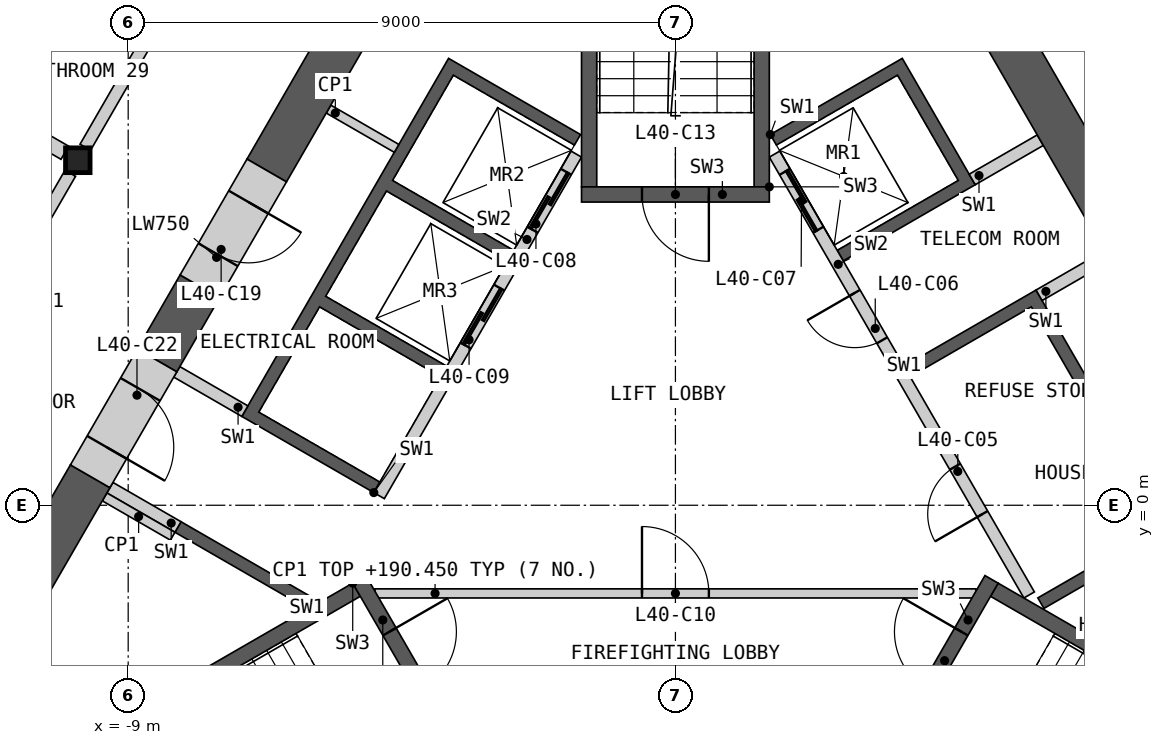
"""IFC4 building model, lengths in metres.
Left out: names, types, materials, properties, quantities, classifications, styles, units other than length and angle.
Written with IfcOpenShell. Run it as: python <this file> out.ifc"""

import sys

from ifc_helpers import new_model, si_unit, direction, frame, frame_2d, origin, origin_2d, place, context, subcontext, project, spatial, polyline, rectangle, i_section, outline, extrude, element, fill, save


model = new_model("IFC4")
c1 = context("Model", 3, precision=1e-05, world=origin(), true_north=direction((0.0, 1.0)))
c2 = subcontext(c1, "Body", "Model", "MODEL_VIEW")
j1 = project(units=[si_unit("LENGTHUNIT", "METRE"), si_unit("PLANEANGLEUNIT", "RADIAN")], contexts=[c1])
p1 = place(None, origin())
s1 = spatial("IfcSite", under=j1, at=p1, CompositionType="ELEMENT")
p2 = place(p1, origin())
s2 = spatial("IfcBuilding", under=s1, at=p2, CompositionType="ELEMENT")
p3 = place(p2, frame((0.0, 0.0, 187.2)))
s3 = spatial("IfcBuildingStorey", under=s2, at=p3, CompositionType="ELEMENT", Elevation=187.2)
p4 = place(p3, frame((-9.828, 5.675, 0.0), z_axis=(0.0, 0.0, 1.0), x_axis=(1.0, 0.0, 0.0)))
e1 = element("IfcColumn", 1, at=p4, inside=s3, PredefinedType="COLUMN", context=c2, shape_type="SweptSolid", body=[
    extrude(i_section(OverallWidth=0.404, OverallDepth=0.407, WebThickness=0.027, FlangeThickness=0.044, at=origin_2d()), origin(), (0.0, 0.0, 1.0), 3.6),
])
p5 = place(p3, origin())
e2 = element("IfcWall", 2, at=p5, inside=s3, PredefinedType="SHEAR", context=c2, shape_type="SweptSolid", body=[
    extrude(outline(polyline([(1.561, 6.097), (3.731, 7.35), (4.931, 5.272), (2.76, 4.019), (2.66, 4.192), (4.652, 5.342), (3.652, 7.074), (1.66, 5.924), (1.561, 6.097)])), origin(), (0.0, 0.0, 1.0), 3.25),
])
p6 = place(p3, origin())
e3 = element("IfcWall", 3, at=p6, inside=s3, PredefinedType="SHEAR", context=c2, shape_type="SweptSolid", body=[
    extrude(outline(polyline([(3.76, 2.287), (5.931, 3.54), (8.231, -0.444), (6.061, -1.697), (5.96, -1.524), (7.952, -0.374), (5.852, 3.263), (3.861, 2.113), (3.76, 2.287)])), origin(), (0.0, 0.0, 1.0), 3.25),
])
p7 = place(p3, frame((5.817, -1.476, 0.0), z_axis=(0.0, 0.0, 1.0), x_axis=(-0.500002616675, 0.866023893041, 0.0)))
e4 = element("IfcWall", 4, at=p7, inside=s3, PredefinedType="SOLIDWALL", context=c2, shape_type="SweptSolid", body=[
    extrude(rectangle(XDim=8.373, YDim=0.2, at=frame_2d((4.187, 0.0))), origin(), (0.0, 0.0, 1.0), 3.25),
])
p8 = place(p7, frame((1.537, 0.0, 0.0)))
e5 = element("IfcOpeningElement", 5, at=p8, cuts=e4, PredefinedType="OPENING", context=c2, shape_type="SweptSolid", body=[
    extrude(rectangle(XDim=0.9, YDim=2.1, at=frame_2d((0.45, 1.05))), frame((0.0, 0.11, 0.0), z_axis=(0.0, -1.0, 0.0), x_axis=(1.0, 0.0, 0.0)), (0.0, 0.0, 1.0), 0.22),
])
p9 = place(p7, frame((4.837, 0.0, 0.0)))
e6 = element("IfcOpeningElement", 6, at=p9, cuts=e4, PredefinedType="OPENING", context=c2, shape_type="SweptSolid", body=[
    extrude(rectangle(XDim=0.9, YDim=2.1, at=frame_2d((0.45, 1.05))), frame((0.0, 0.11, 0.0), z_axis=(0.0, -1.0, 0.0), x_axis=(1.0, 0.0, 0.0)), (0.0, 0.0, 1.0), 0.22),
])
p10 = place(p7, frame((6.937, 0.0, 0.0)))
e7 = element("IfcOpeningElement", 7, at=p10, cuts=e4, PredefinedType="OPENING", context=c2, shape_type="SweptSolid", body=[
    extrude(rectangle(XDim=1.1, YDim=2.1, at=frame_2d((0.55, 1.05))), frame((0.0, 0.11, 0.0), z_axis=(0.0, -1.0, 0.0), x_axis=(1.0, 0.0, 0.0)), (0.0, 0.0, 1.0), 0.22),
])
p11 = place(p3, frame((5.981, 3.453, 0.0), z_axis=(0.0, 0.0, 1.0), x_axis=(0.865968639725, 0.500098305348, 0.0)))
e8 = element("IfcWall", 8, at=p11, inside=s3, PredefinedType="SHEAR", context=c2, shape_type="SweptSolid", body=[
    extrude(rectangle(XDim=1.293, YDim=0.2, at=frame_2d((0.646, 0.0))), origin(), (0.0, 0.0, 1.0), 3.25),
])
p12 = place(p3, frame((4.881, 5.358, 0.0), z_axis=(0.0, 0.0, 1.0), x_axis=(0.866084958089, 0.499896834728, 0.0)))
e9 = element("IfcWall", 9, at=p12, inside=s3, PredefinedType="SHEAR", context=c2, shape_type="SweptSolid", body=[
    extrude(rectangle(XDim=1.293, YDim=0.2, at=frame_2d((0.646, 0.0))), origin(), (0.0, 0.0, 1.0), 3.25),
])
p13 = place(p3, origin())
e10 = element("IfcWall", 10, at=p13, inside=s3, PredefinedType="SHEAR", context=c2, shape_type="SweptSolid", body=[
    extrude(outline(polyline([(-6.061, -1.697), (-8.231, -0.444), (-8.131, -0.271), (-5.96, -1.524), (-6.061, -1.697)])), origin(), (0.0, 0.0, 1.0), 3.25),
])
p14 = place(p3, origin())
e11 = element("IfcWall", 11, at=p14, inside=s3, PredefinedType="SHEAR", context=c2, shape_type="SweptSolid", body=[
    extrude(outline(polyline([(-4.96, 0.208), (-7.131, 1.461), (-3.731, 7.35), (-1.561, 6.097), (-1.66, 5.924), (-3.652, 7.074), (-4.652, 5.342), (-2.66, 4.192), (-2.76, 4.019), (-4.752, 5.169), (-5.752, 3.437), (-3.76, 2.287), (-3.861, 2.113), (-5.852, 3.263), (-6.852, 1.531), (-4.861, 0.381), (-4.96, 0.208)])), origin(), (0.0, 0.0, 1.0), 3.25),
])
p15 = place(p3, frame((-1.631, 5.776, 0.0), z_axis=(0.0, 0.0, 1.0), x_axis=(-0.499992876559, -0.866029516466, 0.0)))
e12 = element("IfcWall", 12, at=p15, inside=s3, PredefinedType="SOLIDWALL", context=c2, shape_type="SweptSolid", body=[
    extrude(rectangle(XDim=6.486, YDim=0.2, at=frame_2d((3.243, 0.0))), origin(), (0.0, 0.0, 1.0), 3.25),
])
p16 = place(p15, frame((0.337, 0.0, 0.0)))
e13 = element("IfcOpeningElement", 13, at=p16, cuts=e12, PredefinedType="OPENING", context=c2, shape_type="SweptSolid", body=[
    extrude(rectangle(XDim=1.1, YDim=2.1, at=frame_2d((0.55, 1.05))), frame((0.0, 0.11, 0.0), z_axis=(0.0, -1.0, 0.0), x_axis=(1.0, 0.0, 0.0)), (0.0, 0.0, 1.0), 0.22),
])
p17 = place(p15, frame((2.537, 0.0, 0.0)))
e14 = element("IfcOpeningElement", 14, at=p17, cuts=e12, PredefinedType="OPENING", context=c2, shape_type="SweptSolid", body=[
    extrude(rectangle(XDim=1.1, YDim=2.1, at=frame_2d((0.55, 1.05))), frame((0.0, 0.11, 0.0), z_axis=(0.0, -1.0, 0.0), x_axis=(1.0, 0.0, 0.0)), (0.0, 0.0, 1.0), 0.22),
])
for number, where, z_axis, x_axis in (
    (15, (-7.081, 1.548, 0.0), (0.0, 0.0, 1.0), (-0.866, 0.5, 0.0)),
    (16, (-8.181, -0.357, 0.0), (0.0, 0.0, 1.0), (-0.866, 0.5, 0.0)),
):
    element("IfcWall", number, at=place(p3, frame(where, z_axis=z_axis, x_axis=x_axis)), inside=s3, PredefinedType="SHEAR", context=c2, shape_type="SweptSolid", body=[
        extrude(rectangle(XDim=1.293, YDim=0.2, at=frame_2d((0.646, 0.0))), origin(), (0.0, 0.0, 1.0), 3.25),
    ])
p18 = place(p3, frame((-4.941, -1.45, 0.0), z_axis=(0.0, 0.0, 1.0), x_axis=(1.0, 0.0, 0.0)))
e17 = element("IfcWall", 17, at=p18, inside=s3, PredefinedType="PARTITIONING", context=c2, shape_type="SweptSolid", body=[
    extrude(rectangle(XDim=9.882, YDim=0.15, at=frame_2d((4.941, 0.0))), origin(), (0.0, 0.0, 1.0), 3.25),
])
p19 = place(p18, frame((4.391, 0.0, 0.0)))
e18 = element("IfcOpeningElement", 18, at=p19, cuts=e17, PredefinedType="OPENING", context=c2, shape_type="SweptSolid", body=[
    extrude(rectangle(XDim=1.1, YDim=2.1, at=frame_2d((0.55, 1.05))), frame((0.0, 0.085, 0.0), z_axis=(0.0, -1.0, 0.0), x_axis=(1.0, 0.0, 0.0)), (0.0, 0.0, 1.0), 0.17),
])
p20 = place(p3, origin())
e19 = element("IfcWall", 19, at=p20, inside=s3, PredefinedType="SHEAR", context=c2, shape_type="SweptSolid", body=[
    extrude(outline(polyline([(-5.307, -1.281), (-10.374, -4.206), (-10.032, -4.298), (-5.182, -1.498), (-5.307, -1.281)])), origin(), (0.0, 0.0, 1.0), 3.25),
])
p21 = place(p3, frame((-5.199, -1.219, 0.0), z_axis=(0.0, 0.0, 1.0), x_axis=(0.499982516597, -0.866035497597, 0.0)))
e20 = element("IfcWall", 20, at=p21, inside=s3, PredefinedType="SHEAR", context=c2, shape_type="SweptSolid", body=[
    extrude(rectangle(XDim=3.088, YDim=0.25, at=frame_2d((1.544, 0.0))), origin(), (0.0, 0.0, 1.0), 3.25),
])
p22 = place(p21, frame((0.994, 0.0, 0.0)))
e21 = element("IfcOpeningElement", 21, at=p22, cuts=e20, PredefinedType="OPENING", context=c2, shape_type="SweptSolid", body=[
    extrude(rectangle(XDim=1.1, YDim=2.1, at=frame_2d((0.55, 1.05))), frame((0.0, 0.135, 0.0), z_axis=(0.0, -1.0, 0.0), x_axis=(1.0, 0.0, 0.0)), (0.0, 0.0, 1.0), 0.27),
])
p23 = place(p3, origin())
e22 = element("IfcWall", 22, at=p23, inside=s3, PredefinedType="SHEAR", context=c2, shape_type="SweptSolid", body=[
    extrude(outline(polyline([(10.032, -4.298), (10.374, -4.206), (5.307, -1.281), (5.182, -1.498), (10.032, -4.298)])), origin(), (0.0, 0.0, 1.0), 3.25),
])
p24 = place(p3, frame((3.655, -3.893, 0.0), z_axis=(0.0, 0.0, 1.0), x_axis=(0.499982516597, 0.866035497597, 0.0)))
e23 = element("IfcWall", 23, at=p24, inside=s3, PredefinedType="SHEAR", context=c2, shape_type="SweptSolid", body=[
    extrude(rectangle(XDim=3.088, YDim=0.25, at=frame_2d((1.544, 0.0))), origin(), (0.0, 0.0, 1.0), 3.25),
])
p25 = place(p24, frame((0.994, 0.0, 0.0)))
e24 = element("IfcOpeningElement", 24, at=p25, cuts=e23, PredefinedType="OPENING", context=c2, shape_type="SweptSolid", body=[
    extrude(rectangle(XDim=1.1, YDim=2.1, at=frame_2d((0.55, 1.05))), frame((0.0, 0.135, 0.0), z_axis=(0.0, -1.0, 0.0), x_axis=(1.0, 0.0, 0.0)), (0.0, 0.0, 1.0), 0.27),
])
p26 = place(p3, origin())
e25 = element("IfcWall", 25, at=p26, inside=s3, PredefinedType="SHEAR", context=c2, shape_type="SweptSolid", body=[
    extrude(outline(polyline([(1.544, 5.237), (1.544, 11.087), (1.294, 10.837), (1.294, 5.237), (1.544, 5.237)])), origin(), (0.0, 0.0, 1.0), 3.25),
])
p27 = place(p3, origin())
e26 = element("IfcWall", 26, at=p27, inside=s3, PredefinedType="SHEAR", context=c2, shape_type="SweptSolid", body=[
    extrude(outline(polyline([(-1.294, 10.837), (-1.544, 11.087), (-1.544, 5.237), (-1.294, 5.237), (-1.294, 10.837)])), origin(), (0.0, 0.0, 1.0), 3.25),
])
p28 = place(p3, frame((1.544, 5.112, 0.0), z_axis=(0.0, 0.0, 1.0), x_axis=(-1.0, 0.0, 0.0)))
e27 = element("IfcWall", 27, at=p28, inside=s3, PredefinedType="SHEAR", context=c2, shape_type="SweptSolid", body=[
    extrude(rectangle(XDim=3.088, YDim=0.25, at=frame_2d((1.544, 0.0))), origin(), (0.0, 0.0, 1.0), 3.25),
])
p29 = place(p28, frame((0.994, 0.0, 0.0)))
e28 = element("IfcOpeningElement", 28, at=p29, cuts=e27, PredefinedType="OPENING", context=c2, shape_type="SweptSolid", body=[
    extrude(rectangle(XDim=1.1, YDim=2.1, at=frame_2d((0.55, 1.05))), frame((0.0, 0.135, 0.0), z_axis=(0.0, -1.0, 0.0), x_axis=(1.0, 0.0, 0.0)), (0.0, 0.0, 1.0), 0.27),
])
for number, where, z_axis, x_axis in (
    (29, (-8.268, -0.509, 0.0), (0.0, 0.0, 1.0), (-0.866, 0.5, 0.0)),
    (30, (-5.705, 6.516, 0.0), (0.0, 0.0, 1.0), (0.866, -0.5, 0.0)),
):
    element("IfcWall", number, at=place(p3, frame(where, z_axis=z_axis, x_axis=x_axis)), inside=s3, PredefinedType="PARTITIONING", context=c2, shape_type="SweptSolid", body=[
        extrude(rectangle(XDim=1.293, YDim=0.15, at=frame_2d((0.646, 0.0))), origin(), (0.0, 0.0, 1.0), 3.25),
    ])
p30 = place(p3, frame((7.964, 3.354, 0.0), z_axis=(0.0, 0.0, 1.0), x_axis=(-0.50002928721, 0.866008494146, 0.0)))
e31 = element("IfcWall", 31, at=p30, inside=s3, PredefinedType="SHEAR", context=c2, shape_type="SweptSolid", body=[
    extrude(rectangle(XDim=6.405, YDim=0.75, at=frame_2d((3.203, 0.0))), origin(), (0.0, 0.0, 1.0), 3.25),
])
p31 = place(p3, frame((-9.625, 0.477, 0.0), z_axis=(0.0, 0.0, 1.0), x_axis=(-0.499986234705, -0.866033351035, 0.0)))
e32 = element("IfcWall", 32, at=p31, inside=s3, PredefinedType="SHEAR", context=c2, shape_type="SweptSolid", body=[
    extrude(rectangle(XDim=9.801, YDim=0.75, at=frame_2d((4.9, 0.0))), origin(), (0.0, 0.0, 1.0), 3.25),
])
p32 = place(p3, frame((-2.622, 12.606, 0.0), z_axis=(0.0, 0.0, 1.0), x_axis=(-0.500014611105, -0.866016967894, 0.0)))
e33 = element("IfcWall", 33, at=p32, inside=s3, PredefinedType="SHEAR", context=c2, shape_type="SweptSolid", body=[
    extrude(rectangle(XDim=8.198, YDim=0.75, at=frame_2d((4.099, 0.0))), origin(), (0.0, 0.0, 1.0), 3.25),
])
p33 = place(p3, frame((-7.821, 3.601, 0.0), z_axis=(0.0, 0.0, 1.0), x_axis=(-0.49996263964, -0.866046972724, 0.0)))
e34 = element("IfcWall", 34, at=p33, inside=s3, PredefinedType="SHEAR", context=c2, shape_type="SweptSolid", body=[
    extrude(rectangle(XDim=1.408, YDim=0.75, at=frame_2d((0.704, 0.0))), origin(), (0.0, 0.0, 1.0), 3.25),
])
p34 = place(p3, frame((-6.721, 5.506, 0.0), z_axis=(0.0, 0.0, 1.0), x_axis=(-0.499946605688, -0.86605622881, 0.0)))
e35 = element("IfcWall", 35, at=p34, inside=s3, PredefinedType="SHEAR", context=c2, shape_type="SweptSolid", body=[
    extrude(rectangle(XDim=2.2, YDim=0.75, at=frame_2d((1.1, 0.0))), origin(), (0.0, 0.0, 1.0), 3.25),
])
p35 = place(p34, frame((0.6, 0.0, 0.0)))
e36 = element("IfcOpeningElement", 36, at=p35, cuts=e35, PredefinedType="OPENING", context=c2, shape_type="SweptSolid", body=[
    extrude(rectangle(XDim=1.0, YDim=2.1, at=frame_2d((0.5, 1.05))), frame((0.0, 0.385, 0.0), z_axis=(0.0, -1.0, 0.0), x_axis=(1.0, 0.0, 0.0)), (0.0, 0.0, 1.0), 0.77),
])
p36 = place(p3, frame((-8.525, 2.382, 0.0), z_axis=(0.0, 0.0, 1.0), x_axis=(-0.500077893725, -0.86598042715, 0.0)))
e37 = element("IfcWall", 37, at=p36, inside=s3, PredefinedType="SHEAR", context=c2, shape_type="SweptSolid", body=[
    extrude(rectangle(XDim=2.2, YDim=0.75, at=frame_2d((1.1, 0.0))), origin(), (0.0, 0.0, 1.0), 3.25),
])
p37 = place(p36, frame((0.55, 0.0, 0.0)))
e38 = element("IfcOpeningElement", 38, at=p37, cuts=e37, PredefinedType="OPENING", context=c2, shape_type="SweptSolid", body=[
    extrude(rectangle(XDim=1.1, YDim=2.1, at=frame_2d((0.55, 1.05))), frame((0.0, 0.385, 0.0), z_axis=(0.0, -1.0, 0.0), x_axis=(1.0, 0.0, 0.0)), (0.0, 0.0, 1.0), 0.77),
])
p38 = place(p3, frame((5.377, 19.385, 0.0), z_axis=(0.0, 0.0, 1.0), x_axis=(0.500000757641, -0.86602496636, 0.0)))
e39 = element("IfcWall", 39, at=p38, inside=s3, PredefinedType="PARTITIONING", context=c2, shape_type="SweptSolid", body=[
    extrude(rectangle(XDim=28.198, YDim=0.2, at=frame_2d((14.099, 0.0))), origin(), (0.0, 0.0, 1.0), 3.25),
])
p39 = place(p38, frame((22.735, 0.0, 0.0)))
e40 = element("IfcOpeningElement", 40, at=p39, cuts=e39, PredefinedType="OPENING", context=c2, shape_type="SweptSolid", body=[
    extrude(rectangle(XDim=1.8, YDim=2.1, at=frame_2d((0.9, 1.05))), frame((0.0, 0.11, 0.0), z_axis=(0.0, -1.0, 0.0), x_axis=(1.0, 0.0, 0.0)), (0.0, 0.0, 1.0), 0.22),
])
p40 = place(p38, frame((14.402, 0.0, 0.0)))
e41 = element("IfcOpeningElement", 41, at=p40, cuts=e39, PredefinedType="OPENING", context=c2, shape_type="SweptSolid", body=[
    extrude(rectangle(XDim=1.0, YDim=2.1, at=frame_2d((0.5, 1.05))), frame((0.0, 0.11, 0.0), z_axis=(0.0, -1.0, 0.0), x_axis=(1.0, 0.0, 0.0)), (0.0, 0.0, 1.0), 0.22),
])
p41 = place(p38, frame((12.796, 0.0, 0.0)))
e42 = element("IfcOpeningElement", 42, at=p41, cuts=e39, PredefinedType="OPENING", context=c2, shape_type="SweptSolid", body=[
    extrude(rectangle(XDim=1.0, YDim=2.1, at=frame_2d((0.5, 1.05))), frame((0.0, 0.11, 0.0), z_axis=(0.0, -1.0, 0.0), x_axis=(1.0, 0.0, 0.0)), (0.0, 0.0, 1.0), 0.22),
])
p42 = place(p38, frame((4.164, 0.0, 0.0)))
e43 = element("IfcOpeningElement", 43, at=p42, cuts=e39, PredefinedType="OPENING", context=c2, shape_type="SweptSolid", body=[
    extrude(rectangle(XDim=1.0, YDim=2.1, at=frame_2d((0.5, 1.05))), frame((0.0, 0.11, 0.0), z_axis=(0.0, -1.0, 0.0), x_axis=(1.0, 0.0, 0.0)), (0.0, 0.0, 1.0), 0.22),
])
p43 = place(p38, frame((1.452, 0.0, 0.0)))
e44 = element("IfcOpeningElement", 44, at=p43, cuts=e39, PredefinedType="OPENING", context=c2, shape_type="SweptSolid", body=[
    extrude(rectangle(XDim=0.95, YDim=2.1, at=frame_2d((0.475, 1.05))), frame((0.0, 0.11, 0.0), z_axis=(0.0, -1.0, 0.0), x_axis=(1.0, 0.0, 0.0)), (0.0, 0.0, 1.0), 0.22),
])
p44 = place(p3, frame((-21.0, 12.124, 0.0), z_axis=(0.0, 0.0, 1.0), x_axis=(0.866025883649, -0.499999168849, 0.0)))
e45 = element("IfcWall", 45, at=p44, inside=s3, PredefinedType="PARTITIONING", context=c2, shape_type="SweptSolid", body=[
    extrude(rectangle(XDim=12.652, YDim=0.25, at=frame_2d((6.326, 0.0))), origin(), (0.0, 0.0, 1.0), 2.404),
])
p45 = place(p3, frame((-9.705, 5.888, 0.0), z_axis=(0.0, 0.0, 1.0), x_axis=(0.50000393355, 0.866023132736, 0.0)))
e46 = element("IfcWall", 46, at=p45, inside=s3, PredefinedType="PARTITIONING", context=c2, shape_type="SweptSolid", body=[
    extrude(rectangle(XDim=9.335, YDim=0.2, at=frame_2d((4.667, 0.0))), origin(), (0.0, 0.0, 1.0), 3.25),
])
p46 = place(p45, frame((5.172, 0.0, 0.0)))
e47 = element("IfcOpeningElement", 47, at=p46, cuts=e46, PredefinedType="OPENING", context=c2, shape_type="SweptSolid", body=[
    extrude(rectangle(XDim=1.0, YDim=2.1, at=frame_2d((0.5, 1.05))), frame((0.0, 0.11, 0.0), z_axis=(0.0, -1.0, 0.0), x_axis=(1.0, 0.0, 0.0)), (0.0, 0.0, 1.0), 0.22),
])
p47 = place(p45, frame((3.565, 0.0, 0.0)))
e48 = element("IfcOpeningElement", 48, at=p47, cuts=e46, PredefinedType="OPENING", context=c2, shape_type="SweptSolid", body=[
    extrude(rectangle(XDim=1.0, YDim=2.1, at=frame_2d((0.5, 1.05))), frame((0.0, 0.11, 0.0), z_axis=(0.0, -1.0, 0.0), x_axis=(1.0, 0.0, 0.0)), (0.0, 0.0, 1.0), 0.22),
])
p48 = place(p3, frame((-14.619, -2.624, 0.0), z_axis=(0.0, 0.0, 1.0), x_axis=(0.50000393355, 0.866023132736, 0.0)))
e49 = element("IfcWall", 49, at=p48, inside=s3, PredefinedType="PARTITIONING", context=c2, shape_type="SweptSolid", body=[
    extrude(rectangle(XDim=9.335, YDim=0.2, at=frame_2d((4.667, 0.0))), origin(), (0.0, 0.0, 1.0), 3.25),
])
p49 = place(p48, frame((4.77, 0.0, 0.0)))
e50 = element("IfcOpeningElement", 50, at=p49, cuts=e49, PredefinedType="OPENING", context=c2, shape_type="SweptSolid", body=[
    extrude(rectangle(XDim=1.0, YDim=2.1, at=frame_2d((0.5, 1.05))), frame((0.0, 0.11, 0.0), z_axis=(0.0, -1.0, 0.0), x_axis=(1.0, 0.0, 0.0)), (0.0, 0.0, 1.0), 0.22),
])
p50 = place(p48, frame((3.163, 0.0, 0.0)))
e51 = element("IfcOpeningElement", 51, at=p50, cuts=e49, PredefinedType="OPENING", context=c2, shape_type="SweptSolid", body=[
    extrude(rectangle(XDim=1.0, YDim=2.1, at=frame_2d((0.5, 1.05))), frame((0.0, 0.11, 0.0), z_axis=(0.0, -1.0, 0.0), x_axis=(1.0, 0.0, 0.0)), (0.0, 0.0, 1.0), 0.22),
])
p51 = place(p8, origin())
e52 = element("IfcDoor", 52, at=p51, inside=s3, OperationType="SINGLE_SWING_LEFT", PredefinedType="DOOR", context=c2, shape_type="SweptSolid", body=[
    extrude(rectangle(XDim=0.9, YDim=2.1, at=frame_2d((0.45, 1.05))), frame((0.0, 0.025, 0.0), z_axis=(0.0, -1.0, 0.0), x_axis=(1.0, 0.0, 0.0)), (0.0, 0.0, 1.0), 0.05),
])
fill(e5, e52)
p52 = place(p9, origin())
e53 = element("IfcDoor", 53, at=p52, inside=s3, OperationType="SINGLE_SWING_RIGHT", PredefinedType="DOOR", context=c2, shape_type="SweptSolid", body=[
    extrude(rectangle(XDim=0.9, YDim=2.1, at=frame_2d((0.45, 1.05))), frame((0.0, 0.025, 0.0), z_axis=(0.0, -1.0, 0.0), x_axis=(1.0, 0.0, 0.0)), (0.0, 0.0, 1.0), 0.05),
])
fill(e6, e53)
p53 = place(p10, origin())
e54 = element("IfcDoor", 54, at=p53, inside=s3, OperationType="SLIDING_TO_LEFT", PredefinedType="DOOR", context=c2, shape_type="SweptSolid", body=[
    extrude(rectangle(XDim=1.1, YDim=2.1, at=frame_2d((0.55, 1.05))), frame((0.0, 0.025, 0.0), z_axis=(0.0, -1.0, 0.0), x_axis=(1.0, 0.0, 0.0)), (0.0, 0.0, 1.0), 0.05),
])
fill(e7, e54)
p54 = place(p16, origin())
e55 = element("IfcDoor", 55, at=p54, inside=s3, OperationType="SLIDING_TO_LEFT", PredefinedType="DOOR", context=c2, shape_type="SweptSolid", body=[
    extrude(rectangle(XDim=1.1, YDim=2.1, at=frame_2d((0.55, 1.05))), frame((0.0, 0.025, 0.0), z_axis=(0.0, -1.0, 0.0), x_axis=(1.0, 0.0, 0.0)), (0.0, 0.0, 1.0), 0.05),
])
fill(e13, e55)
p55 = place(p17, origin())
e56 = element("IfcDoor", 56, at=p55, inside=s3, OperationType="SLIDING_TO_LEFT", PredefinedType="DOOR", context=c2, shape_type="SweptSolid", body=[
    extrude(rectangle(XDim=1.1, YDim=2.1, at=frame_2d((0.55, 1.05))), frame((0.0, 0.025, 0.0), z_axis=(0.0, -1.0, 0.0), x_axis=(1.0, 0.0, 0.0)), (0.0, 0.0, 1.0), 0.05),
])
fill(e14, e56)
p56 = place(p19, origin())
e57 = element("IfcDoor", 57, at=p56, inside=s3, OperationType="SINGLE_SWING_LEFT", PredefinedType="DOOR", context=c2, shape_type="SweptSolid", body=[
    extrude(rectangle(XDim=1.1, YDim=2.1, at=frame_2d((0.55, 1.05))), frame((0.0, 0.025, 0.0), z_axis=(0.0, -1.0, 0.0), x_axis=(1.0, 0.0, 0.0)), (0.0, 0.0, 1.0), 0.05),
])
fill(e18, e57)
p57 = place(p22, origin())
e58 = element("IfcDoor", 58, at=p57, inside=s3, OperationType="SINGLE_SWING_LEFT", PredefinedType="DOOR", context=c2, shape_type="SweptSolid", body=[
    extrude(rectangle(XDim=1.1, YDim=2.1, at=frame_2d((0.55, 1.05))), frame((0.0, 0.025, 0.0), z_axis=(0.0, -1.0, 0.0), x_axis=(1.0, 0.0, 0.0)), (0.0, 0.0, 1.0), 0.05),
])
fill(e21, e58)
p58 = place(p25, origin())
e59 = element("IfcDoor", 59, at=p58, inside=s3, OperationType="SINGLE_SWING_RIGHT", PredefinedType="DOOR", context=c2, shape_type="SweptSolid", body=[
    extrude(rectangle(XDim=1.1, YDim=2.1, at=frame_2d((0.55, 1.05))), frame((0.0, 0.025, 0.0), z_axis=(0.0, -1.0, 0.0), x_axis=(1.0, 0.0, 0.0)), (0.0, 0.0, 1.0), 0.05),
])
fill(e24, e59)
p59 = place(p29, origin())
e60 = element("IfcDoor", 60, at=p59, inside=s3, OperationType="SINGLE_SWING_LEFT", PredefinedType="DOOR", context=c2, shape_type="SweptSolid", body=[
    extrude(rectangle(XDim=1.1, YDim=2.1, at=frame_2d((0.55, 1.05))), frame((0.0, 0.025, 0.0), z_axis=(0.0, -1.0, 0.0), x_axis=(1.0, 0.0, 0.0)), (0.0, 0.0, 1.0), 0.05),
])
fill(e28, e60)
p60 = place(p35, origin())
e61 = element("IfcDoor", 61, at=p60, inside=s3, OperationType="SINGLE_SWING_LEFT", PredefinedType="DOOR", context=c2, shape_type="SweptSolid", body=[
    extrude(rectangle(XDim=1.0, YDim=2.1, at=frame_2d((0.5, 1.05))), frame((0.0, 0.13, 0.0), z_axis=(0.0, -1.0, 0.0), x_axis=(1.0, 0.0, 0.0)), (0.0, 0.0, 1.0), 0.05),
])
fill(e36, e61)
p61 = place(p37, origin())
e62 = element("IfcDoor", 62, at=p61, inside=s3, OperationType="SINGLE_SWING_RIGHT", PredefinedType="DOOR", context=c2, shape_type="SweptSolid", body=[
    extrude(rectangle(XDim=1.1, YDim=2.1, at=frame_2d((0.55, 1.05))), frame((0.0, 0.13, 0.0), z_axis=(0.0, -1.0, 0.0), x_axis=(1.0, 0.0, 0.0)), (0.0, 0.0, 1.0), 0.05),
])
fill(e38, e62)
save(model, sys.argv[1])
